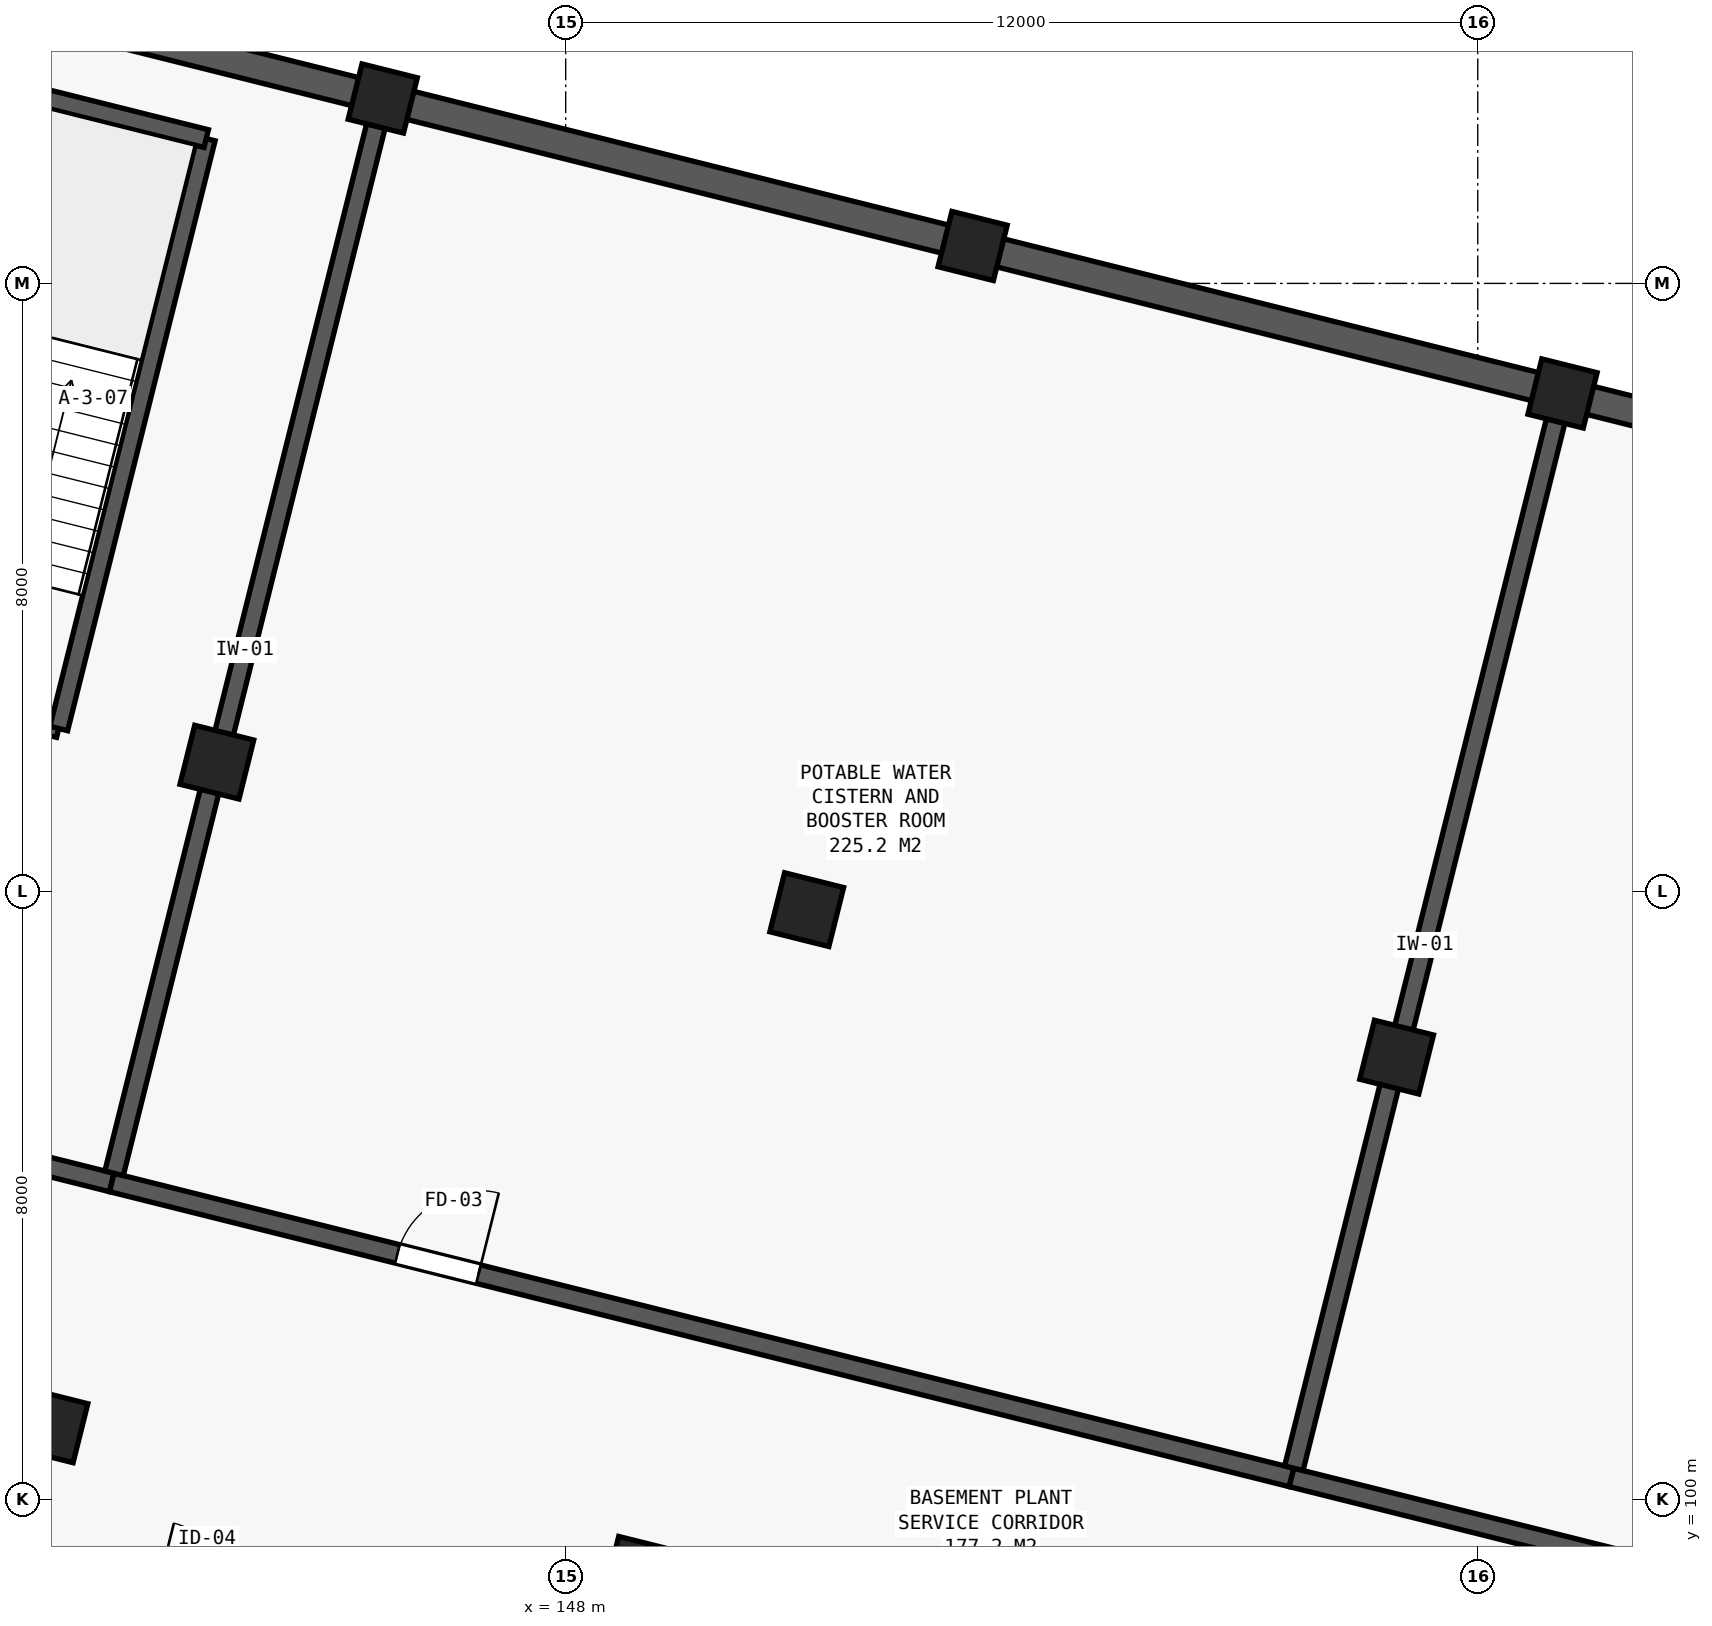
"""IFC4 building model, lengths in metres.
Left out: names, types, materials, properties, quantities, classifications, styles, units other than length and angle.
Written with IfcOpenShell. Run it as: python <this file> out.ifc"""

import sys

from ifc_helpers import new_model, si_unit, direction, frame, frame_2d, origin, origin_2d, place, context, subcontext, project, spatial, rectangle, extrude, element, fill, save


model = new_model("IFC4")
c1 = context("Model", 3, precision=1e-05, world=origin(), true_north=direction((0.0, 1.0)))
c2 = subcontext(c1, "Body", "Model", "MODEL_VIEW")
j1 = project(units=[si_unit("LENGTHUNIT", "METRE"), si_unit("PLANEANGLEUNIT", "RADIAN")], contexts=[c1])
p1 = place(None, origin())
s1 = spatial("IfcSite", under=j1, at=p1, CompositionType="ELEMENT")
p2 = place(p1, origin())
s2 = spatial("IfcBuilding", under=s1, at=p2, CompositionType="ELEMENT")
p3 = place(p2, frame((0.0, 0.0, -4.2)))
s3 = spatial("IfcBuildingStorey", under=s2, at=p3, CompositionType="ELEMENT", Elevation=-4.2)
for number, where, z_axis, x_axis in (
    (1, (141.227, 100.97, -0.4), (0.0, 0.0, 1.0), (0.97, -0.243, 0.0)),
    (2, (143.41, 109.701, -0.4), (0.0, 0.0, 1.0), (0.97, -0.243, 0.0)),
):
    element("IfcColumn", number, at=place(p3, frame(where, z_axis=z_axis, x_axis=x_axis)), inside=s3, PredefinedType="COLUMN", context=c2, shape_type="SweptSolid", body=[
        extrude(rectangle(XDim=0.8, YDim=0.8, at=origin_2d()), origin(), (0.0, 0.0, 1.0), 4.6),
    ])
p4 = place(p3, frame((145.593, 118.433, -0.4), z_axis=(0.0, 0.0, 1.0), x_axis=(0.970142500145, -0.242535625038, 0.0)))
e3 = element("IfcColumn", 3, at=p4, inside=s3, PredefinedType="COLUMN", context=c2, shape_type="SweptSolid", body=[
    extrude(rectangle(XDim=0.75, YDim=0.75, at=origin_2d()), origin(), (0.0, 0.0, 1.0), 4.6),
])
for number, where, z_axis, x_axis in (
    (4, (148.989, 99.03, -0.4), (0.0, 0.0, 1.0), (0.97, -0.243, 0.0)),
    (5, (151.171, 107.761, -0.4), (0.0, 0.0, 1.0), (0.97, -0.243, 0.0)),
):
    element("IfcColumn", number, at=place(p3, frame(where, z_axis=z_axis, x_axis=x_axis)), inside=s3, PredefinedType="COLUMN", context=c2, shape_type="SweptSolid", body=[
        extrude(rectangle(XDim=0.8, YDim=0.8, at=origin_2d()), origin(), (0.0, 0.0, 1.0), 4.6),
    ])
p5 = place(p3, frame((153.354, 116.492, -0.4), z_axis=(0.0, 0.0, 1.0), x_axis=(0.970142500145, -0.242535625038, 0.0)))
e6 = element("IfcColumn", 6, at=p5, inside=s3, PredefinedType="COLUMN", context=c2, shape_type="SweptSolid", body=[
    extrude(rectangle(XDim=0.75, YDim=0.75, at=origin_2d()), origin(), (0.0, 0.0, 1.0), 4.6),
])
p6 = place(p3, frame((158.932, 105.821, -0.4), z_axis=(0.0, 0.0, 1.0), x_axis=(0.970142500145, -0.242535625038, 0.0)))
e7 = element("IfcColumn", 7, at=p6, inside=s3, PredefinedType="COLUMN", context=c2, shape_type="SweptSolid", body=[
    extrude(rectangle(XDim=0.8, YDim=0.8, at=origin_2d()), origin(), (0.0, 0.0, 1.0), 4.6),
])
p7 = place(p3, frame((161.115, 114.552, -0.4), z_axis=(0.0, 0.0, 1.0), x_axis=(0.970142500145, -0.242535625038, 0.0)))
e8 = element("IfcColumn", 8, at=p7, inside=s3, PredefinedType="COLUMN", context=c2, shape_type="SweptSolid", body=[
    extrude(rectangle(XDim=0.75, YDim=0.75, at=origin_2d()), origin(), (0.0, 0.0, 1.0), 4.6),
])
p8 = place(p3, frame((137.832, 120.373, 0.0), z_axis=(0.0, 0.0, 1.0), x_axis=(0.970138909791, -0.242549986002, 0.0)))
e9 = element("IfcWall", 9, at=p8, inside=s3, PredefinedType="SOLIDWALL", context=c2, shape_type="SweptSolid", body=[
    extrude(rectangle(XDim=8.0, YDim=0.38, at=frame_2d((4.0, 0.0))), origin(), (0.0, 0.0, 1.0), 3.9),
])
p9 = place(p3, frame((145.593, 118.433, 0.0), z_axis=(0.0, 0.0, 1.0), x_axis=(0.970146090314, -0.242521263911, 0.0)))
e10 = element("IfcWall", 10, at=p9, inside=s3, PredefinedType="SOLIDWALL", context=c2, shape_type="SweptSolid", body=[
    extrude(rectangle(XDim=8.0, YDim=0.38, at=frame_2d((4.0, 0.0))), origin(), (0.0, 0.0, 1.0), 3.9),
])
p10 = place(p3, frame((153.354, 116.492, 0.0), z_axis=(0.0, 0.0, 1.0), x_axis=(0.970144295309, -0.242528444268, 0.0)))
e11 = element("IfcWall", 11, at=p10, inside=s3, PredefinedType="SOLIDWALL", context=c2, shape_type="SweptSolid", body=[
    extrude(rectangle(XDim=8.0, YDim=0.38, at=frame_2d((4.0, 0.0))), origin(), (0.0, 0.0, 1.0), 3.9),
])
p11 = place(p3, frame((161.115, 114.552, 0.0), z_axis=(0.0, 0.0, 1.0), x_axis=(0.970138909791, -0.242549986002, 0.0)))
e12 = element("IfcWall", 12, at=p11, inside=s3, PredefinedType="SOLIDWALL", context=c2, shape_type="SweptSolid", body=[
    extrude(rectangle(XDim=8.0, YDim=0.38, at=frame_2d((4.0, 0.0))), origin(), (0.0, 0.0, 1.0), 3.9),
])
p12 = place(p3, frame((141.331, 110.144, 0.0), z_axis=(0.0, 0.0, 1.0), x_axis=(-0.970134840723, 0.242566260672, 0.0)))
e13 = element("IfcWall", 13, at=p12, inside=s3, PredefinedType="SOLIDWALL", context=c2, shape_type="SweptSolid", body=[
    extrude(rectangle(XDim=3.75, YDim=0.24, at=frame_2d((1.875, 0.0))), origin(), (0.0, 0.0, 1.0), 3.9),
])
p13 = place(p12, frame((1.225, 0.0, 0.0)))
e14 = element("IfcOpeningElement", 14, at=p13, cuts=e13, PredefinedType="OPENING", context=c2, shape_type="SweptSolid", body=[
    extrude(rectangle(XDim=1.3, YDim=2.15, at=frame_2d((0.65, 1.075))), frame((0.0, 0.13, 0.0), z_axis=(0.0, -1.0, 0.0), x_axis=(1.0, 0.0, 0.0)), (0.0, 0.0, 1.0), 0.26),
])
p14 = place(p3, frame((143.271, 117.905, 0.0), z_axis=(0.0, 0.0, 1.0), x_axis=(-0.242521263911, -0.970146090314, 0.0)))
e15 = element("IfcWall", 15, at=p14, inside=s3, PredefinedType="SOLIDWALL", context=c2, shape_type="SweptSolid", body=[
    extrude(rectangle(XDim=8.0, YDim=0.24, at=frame_2d((4.0, 0.0))), origin(), (0.0, 0.0, 1.0), 3.9),
])
p15 = place(p3, frame((139.633, 118.815, 0.0), z_axis=(0.0, 0.0, 1.0), x_axis=(0.970146329796, -0.242520305918, 0.0)))
e16 = element("IfcWall", 16, at=p15, inside=s3, PredefinedType="SOLIDWALL", context=c2, shape_type="SweptSolid", body=[
    extrude(rectangle(XDim=3.75, YDim=0.24, at=frame_2d((1.875, 0.0))), origin(), (0.0, 0.0, 1.0), 3.9),
])
p16 = place(p3, frame((126.505, 108.052, 0.0), z_axis=(0.0, 0.0, 1.0), x_axis=(0.970142500145, -0.242535625036, 0.0)))
e17 = element("IfcWall", 17, at=p16, inside=s3, PredefinedType="SOLIDWALL", context=c2, shape_type="SweptSolid", body=[
    extrude(rectangle(XDim=16.0, YDim=0.25, at=frame_2d((8.0, 0.0))), origin(), (0.0, 0.0, 1.0), 3.8),
])
p17 = place(p16, frame((3.874, 0.0, 0.0)))
e18 = element("IfcOpeningElement", 18, at=p17, cuts=e17, PredefinedType="OPENING", context=c2, shape_type="SweptSolid", body=[
    extrude(rectangle(XDim=1.1, YDim=2.15, at=frame_2d((0.55, 1.075))), frame((0.0, 0.135, 0.0), z_axis=(0.0, -1.0, 0.0), x_axis=(1.0, 0.0, 0.0)), (0.0, 0.0, 1.0), 0.27),
])
p18 = place(p3, frame((142.028, 104.172, 0.0), z_axis=(0.0, 0.0, 1.0), x_axis=(0.97014160256, -0.242539215349, 0.0)))
e19 = element("IfcWall", 19, at=p18, inside=s3, PredefinedType="SOLIDWALL", context=c2, shape_type="SweptSolid", body=[
    extrude(rectangle(XDim=16.0, YDim=0.25, at=frame_2d((8.0, 0.0))), origin(), (0.0, 0.0, 1.0), 3.8),
])
p19 = place(p18, frame((3.874, 0.0, 0.0)))
e20 = element("IfcOpeningElement", 20, at=p19, cuts=e19, PredefinedType="OPENING", context=c2, shape_type="SweptSolid", body=[
    extrude(rectangle(XDim=1.1, YDim=2.15, at=frame_2d((0.55, 1.075))), frame((0.0, 0.135, 0.0), z_axis=(0.0, -1.0, 0.0), x_axis=(1.0, 0.0, 0.0)), (0.0, 0.0, 1.0), 0.27),
])
p20 = place(p3, frame((157.55, 100.291, 0.0), z_axis=(0.0, 0.0, 1.0), x_axis=(0.970142500145, -0.242535625036, 0.0)))
e21 = element("IfcWall", 21, at=p20, inside=s3, PredefinedType="SOLIDWALL", context=c2, shape_type="SweptSolid", body=[
    extrude(rectangle(XDim=15.81, YDim=0.25, at=frame_2d((7.905, 0.0))), origin(), (0.0, 0.0, 1.0), 3.8),
])
p21 = place(p20, frame((11.768, 0.0, 0.0)))
e22 = element("IfcOpeningElement", 22, at=p21, cuts=e21, PredefinedType="OPENING", context=c2, shape_type="SweptSolid", body=[
    extrude(rectangle(XDim=1.1, YDim=2.15, at=frame_2d((0.55, 1.075))), frame((0.0, 0.135, 0.0), z_axis=(0.0, -1.0, 0.0), x_axis=(1.0, 0.0, 0.0)), (0.0, 0.0, 1.0), 0.27),
])
p22 = place(p3, frame((142.058, 104.293, 0.0), z_axis=(0.0, 0.0, 1.0), x_axis=(0.242527534102, 0.970144522843, 0.0)))
e23 = element("IfcWall", 23, at=p22, inside=s3, PredefinedType="SOLIDWALL", context=c2, shape_type="SweptSolid", body=[
    extrude(rectangle(XDim=14.2, YDim=0.25, at=frame_2d((7.1, 0.0))), origin(), (0.0, 0.0, 1.0), 3.8),
])
p23 = place(p3, frame((157.58, 100.412, 0.0), z_axis=(0.0, 0.0, 1.0), x_axis=(0.24254371592, 0.970140477388, 0.0)))
e24 = element("IfcWall", 24, at=p23, inside=s3, PredefinedType="SOLIDWALL", context=c2, shape_type="SweptSolid", body=[
    extrude(rectangle(XDim=14.2, YDim=0.25, at=frame_2d((7.1, 0.0))), origin(), (0.0, 0.0, 1.0), 3.8),
])
p24 = place(p19, origin())
e25 = element("IfcDoor", 25, at=p24, inside=s3, OperationType="SINGLE_SWING_RIGHT", PredefinedType="DOOR", context=c2, shape_type="SweptSolid", body=[
    extrude(rectangle(XDim=1.1, YDim=2.15, at=frame_2d((0.55, 1.075))), frame((0.0, 0.025, 0.0), z_axis=(0.0, -1.0, 0.0), x_axis=(1.0, 0.0, 0.0)), (0.0, 0.0, 1.0), 0.05),
])
fill(e20, e25)
save(model, sys.argv[1])
